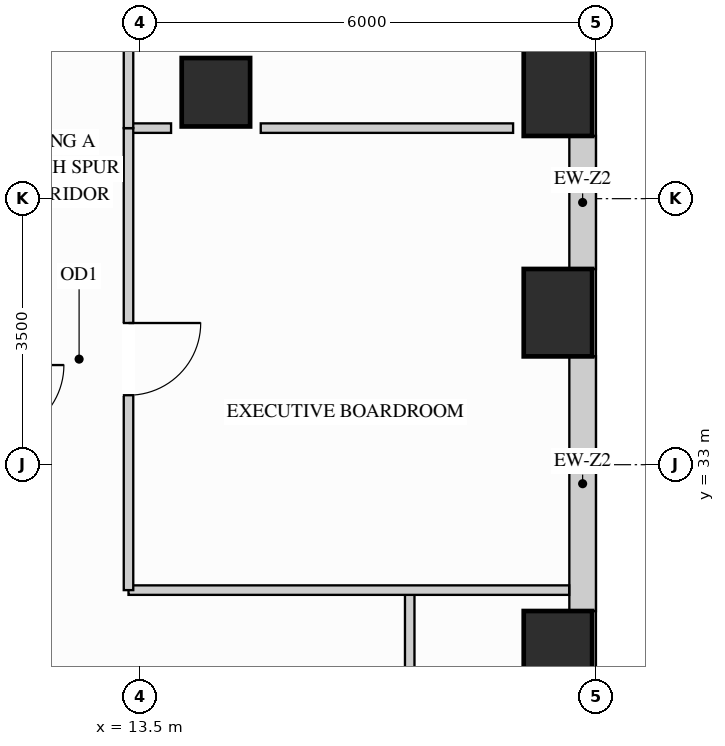
"""IFC4 building model, lengths in metres.
Left out: names, types, materials, properties, quantities, classifications, styles, units other than length and angle.
Written with IfcOpenShell. Run it as: python <this file> out.ifc"""

import sys

from ifc_helpers import new_model, si_unit, direction, frame, frame_2d, origin, origin_2d, place, context, subcontext, project, spatial, rectangle, extrude, source, transform, mapped, element, fill, save


model = new_model("IFC4")
c1 = context("Model", 3, precision=1e-05, world=origin(), true_north=direction((0.0, 1.0)))
c2 = subcontext(c1, "Body", "Model", "MODEL_VIEW")
j1 = project(units=[si_unit("LENGTHUNIT", "METRE"), si_unit("PLANEANGLEUNIT", "RADIAN")], contexts=[c1])
p1 = place(None, origin())
s1 = spatial("IfcSite", under=j1, at=p1, CompositionType="ELEMENT")
p2 = place(p1, origin())
s2 = spatial("IfcBuilding", under=s1, at=p2, CompositionType="ELEMENT")
p3 = place(p2, frame((0.0, 0.0, 88.2)))
s3 = spatial("IfcBuildingStorey", under=s2, at=p3, CompositionType="ELEMENT", Elevation=88.2)
m1 = source(origin(), c2, "Body", "SweptSolid", [
    extrude(rectangle(XDim=0.9, YDim=0.9, at=origin_2d()), origin(), (0.0, 0.0, 1.0), 3.38),
])
p4 = place(p3, frame((14.5, 37.9, 0.0), z_axis=(0.0, 0.0, 1.0), x_axis=(1.0, 0.0, 0.0)))
e1 = element("IfcColumn", 1, at=p4, inside=s3, PredefinedType="COLUMN", context=c2, shape_type="MappedRepresentation", body=[
    mapped(m1, transform((0.0, 0.0, 0.0), x_axis=(1.0, 0.0, 0.0), y_axis=(0.0, 1.0, 0.0), z_axis=(0.0, 0.0, 1.0))),
])
m2 = source(origin(), c2, "Body", "SweptSolid", [
    extrude(rectangle(XDim=0.9, YDim=1.15, at=origin_2d()), origin(), (0.0, 0.0, 1.0), 3.38),
])
for number, where, z_axis, x_axis in (
    (2, (19.0, 30.5, 0.0), (0.0, 0.0, 1.0), (1.0, 0.0, 0.0)),
    (3, (19.0, 35.0, 0.0), (0.0, 0.0, 1.0), (1.0, 0.0, 0.0)),
    (4, (19.0, 37.9, 0.0), (0.0, 0.0, 1.0), (1.0, 0.0, 0.0)),
):
    element("IfcColumn", number, at=place(p3, frame(where, z_axis=z_axis, x_axis=x_axis)), inside=s3, PredefinedType="COLUMN", context=c2, shape_type="MappedRepresentation", body=[
        mapped(m2, transform((0.0, 0.0, 0.0), x_axis=(1.0, 0.0, 0.0), y_axis=(0.0, 1.0, 0.0), z_axis=(0.0, 0.0, 1.0))),
    ])
m3 = source(origin(), c2, "Body", "SweptSolid", [
    extrude(rectangle(XDim=3.354, YDim=0.35, at=frame_2d((1.677, 0.0))), origin(), (0.0, 0.0, 1.0), 2.519),
])
p5 = place(p3, frame((19.325, 31.073, 0.0), z_axis=(0.0, 0.0, 1.0), x_axis=(0.0, 1.0, 0.0)))
e5 = element("IfcWall", 5, at=p5, inside=s3, PredefinedType="SOLIDWALL", context=c2, shape_type="MappedRepresentation", body=[
    mapped(m3, transform((0.0, 0.0, 0.0), x_axis=(1.0, 0.0, 0.0), y_axis=(0.0, 1.0, 0.0), z_axis=(0.0, 0.0, 1.0))),
])
m4 = source(origin(), c2, "Body", "SweptSolid", [
    extrude(rectangle(XDim=1.754, YDim=0.35, at=frame_2d((0.877, 0.0))), origin(), (0.0, 0.0, 1.0), 2.519),
])
p6 = place(p3, frame((19.325, 35.573, 0.0), z_axis=(0.0, 0.0, 1.0), x_axis=(0.0, 1.0, 0.0)))
e6 = element("IfcWall", 6, at=p6, inside=s3, PredefinedType="SOLIDWALL", context=c2, shape_type="MappedRepresentation", body=[
    mapped(m4, transform((0.0, 0.0, 0.0), x_axis=(1.0, 0.0, 0.0), y_axis=(0.0, 1.0, 0.0), z_axis=(0.0, 0.0, 1.0))),
])
p7 = place(p3, frame((17.05, 26.05, 0.0), z_axis=(0.0, 0.0, 1.0), x_axis=(0.0, 1.0, 0.0)))
e7 = element("IfcWall", 7, at=p7, inside=s3, PredefinedType="PARTITIONING", context=c2, shape_type="SweptSolid", body=[
    extrude(rectangle(XDim=5.3, YDim=0.125, at=frame_2d((2.65, 0.0))), origin(), (0.0, 0.0, 1.0), 3.365),
])
p8 = place(p7, frame((2.175, 0.0, 0.0)))
e8 = element("IfcOpeningElement", 8, at=p8, cuts=e7, PredefinedType="OPENING", context=c2, shape_type="SweptSolid", body=[
    extrude(rectangle(XDim=0.95, YDim=2.15, at=frame_2d((0.475, 1.075))), frame((0.0, 0.073, 0.0), z_axis=(0.0, -1.0, 0.0), x_axis=(1.0, 0.0, 0.0)), (0.0, 0.0, 1.0), 0.145),
])
m5 = source(origin(), c2, "Body", "SweptSolid", [
    extrude(rectangle(XDim=0.56, YDim=0.125, at=frame_2d((0.28, 0.0))), origin(), (0.0, 0.0, 1.0), 3.365),
])
p9 = place(p3, frame((13.35, 37.428, 0.0), z_axis=(0.0, 0.0, 1.0), x_axis=(1.0, 0.0, 0.0)))
e9 = element("IfcWall", 9, at=p9, inside=s3, PredefinedType="PARTITIONING", context=c2, shape_type="MappedRepresentation", body=[
    mapped(m5, transform((0.0, 0.0, 0.0), x_axis=(1.0, 0.0, 0.0), y_axis=(0.0, 1.0, 0.0), z_axis=(0.0, 0.0, 1.0))),
])
m6 = source(origin(), c2, "Body", "SweptSolid", [
    extrude(rectangle(XDim=3.32, YDim=0.125, at=frame_2d((1.66, 0.0))), origin(), (0.0, 0.0, 1.0), 3.365),
])
p10 = place(p3, frame((15.09, 37.428, 0.0), z_axis=(0.0, 0.0, 1.0), x_axis=(1.0, 0.0, 0.0)))
e10 = element("IfcWall", 10, at=p10, inside=s3, PredefinedType="PARTITIONING", context=c2, shape_type="MappedRepresentation", body=[
    mapped(m6, transform((0.0, 0.0, 0.0), x_axis=(1.0, 0.0, 0.0), y_axis=(0.0, 1.0, 0.0), z_axis=(0.0, 0.0, 1.0))),
])
m7 = source(origin(), c2, "Body", "SweptSolid", [
    extrude(rectangle(XDim=5.798, YDim=0.125, at=frame_2d((2.899, 0.0))), origin(), (0.0, 0.0, 1.0), 3.365),
])
p11 = place(p3, frame((13.35, 31.35, 0.0), z_axis=(0.0, 0.0, 1.0), x_axis=(1.0, 0.0, 0.0)))
e11 = element("IfcWall", 11, at=p11, inside=s3, PredefinedType="PARTITIONING", context=c2, shape_type="MappedRepresentation", body=[
    mapped(m7, transform((0.0, 0.0, 0.0), x_axis=(1.0, 0.0, 0.0), y_axis=(0.0, 1.0, 0.0), z_axis=(0.0, 0.0, 1.0))),
])
p12 = place(p3, frame((13.35, 31.35, 0.0), z_axis=(0.0, 0.0, 1.0), x_axis=(0.0, 1.0, 0.0)))
e12 = element("IfcWall", 12, at=p12, inside=s3, PredefinedType="PARTITIONING", context=c2, shape_type="SweptSolid", body=[
    extrude(rectangle(XDim=6.078, YDim=0.125, at=frame_2d((3.039, 0.0))), origin(), (0.0, 0.0, 1.0), 3.365),
])
p13 = place(p12, frame((2.564, 0.0, 0.0)))
e13 = element("IfcOpeningElement", 13, at=p13, cuts=e12, PredefinedType="OPENING", context=c2, shape_type="SweptSolid", body=[
    extrude(rectangle(XDim=0.95, YDim=2.15, at=frame_2d((0.475, 1.075))), frame((0.0, 0.073, 0.0), z_axis=(0.0, -1.0, 0.0), x_axis=(1.0, 0.0, 0.0)), (0.0, 0.0, 1.0), 0.145),
])
p14 = place(p3, frame((13.35, 37.428, 0.0), z_axis=(0.0, 0.0, 1.0), x_axis=(0.0, 1.0, 0.0)))
e14 = element("IfcWall", 14, at=p14, inside=s3, PredefinedType="PARTITIONING", context=c2, shape_type="SweptSolid", body=[
    extrude(rectangle(XDim=4.972, YDim=0.125, at=frame_2d((2.486, 0.0))), origin(), (0.0, 0.0, 1.0), 3.365),
])
p15 = place(p14, frame((2.011, 0.0, 0.0)))
e15 = element("IfcOpeningElement", 15, at=p15, cuts=e14, PredefinedType="OPENING", context=c2, shape_type="SweptSolid", body=[
    extrude(rectangle(XDim=0.95, YDim=2.15, at=frame_2d((0.475, 1.075))), frame((0.0, 0.073, 0.0), z_axis=(0.0, -1.0, 0.0), x_axis=(1.0, 0.0, 0.0)), (0.0, 0.0, 1.0), 0.145),
])
m8 = source(origin(), c2, "Body", "SweptSolid", [
    extrude(rectangle(XDim=0.95, YDim=2.15, at=frame_2d((0.475, 1.075))), frame((0.0, 0.025, 0.0), z_axis=(0.0, -1.0, 0.0), x_axis=(1.0, 0.0, 0.0)), (0.0, 0.0, 1.0), 0.05),
])
p16 = place(p13, origin())
e16 = element("IfcDoor", 16, at=p16, inside=s3, OperationType="SINGLE_SWING_RIGHT", PredefinedType="DOOR", context=c2, shape_type="MappedRepresentation", body=[
    mapped(m8, transform((0.0, 0.0, 0.0), x_axis=(1.0, 0.0, 0.0), y_axis=(0.0, 1.0, 0.0), z_axis=(0.0, 0.0, 1.0))),
])
fill(e13, e16)
save(model, sys.argv[1])
